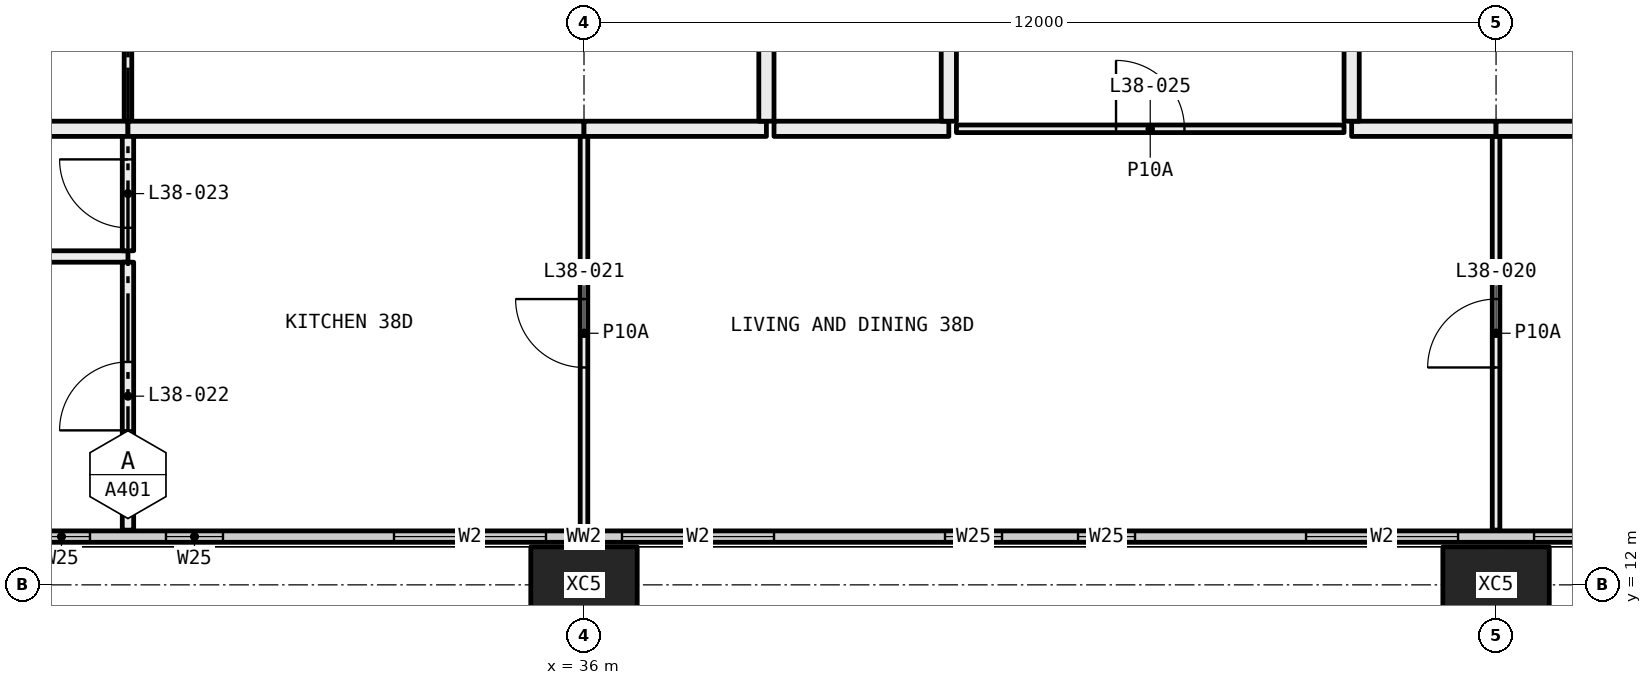
"""IFC4 building model, lengths in metres.
Left out: names, types, materials, properties, quantities, classifications, styles, units other than length and angle.
Written with IfcOpenShell. Run it as: python <this file> out.ifc"""

import sys

from ifc_helpers import new_model, si_unit, direction, frame, frame_2d, origin, origin_2d, place, context, subcontext, project, spatial, rectangle, hollow_rectangle, extrude, element, fill, save


model = new_model("IFC4")
c1 = context("Model", 3, precision=1e-05, world=origin(), true_north=direction((0.0, 1.0)))
c2 = subcontext(c1, "Body", "Model", "MODEL_VIEW")
j1 = project(units=[si_unit("LENGTHUNIT", "METRE"), si_unit("PLANEANGLEUNIT", "RADIAN")], contexts=[c1])
p1 = place(None, origin())
s1 = spatial("IfcSite", under=j1, at=p1, CompositionType="ELEMENT")
p2 = place(p1, origin())
s2 = spatial("IfcBuilding", under=s1, at=p2, CompositionType="ELEMENT")
p3 = place(p2, frame((0.0, 0.0, 144.9)))
s3 = spatial("IfcBuildingStorey", under=s2, at=p3, CompositionType="ELEMENT", Elevation=144.9)
for number, where, z_axis, x_axis in (
    (1, (36.0, 12.0, -0.4), (0.0, 0.0, 1.0), (1.0, 0.0, 0.0)),
    (2, (48.0, 12.0, -0.4), (0.0, 0.0, 1.0), (1.0, 0.0, 0.0)),
):
    element("IfcColumn", number, at=place(p3, frame(where, z_axis=z_axis, x_axis=x_axis)), inside=s3, PredefinedType="COLUMN", context=c2, shape_type="SweptSolid", body=[
        extrude(hollow_rectangle(XDim=1.4, YDim=1.0, WallThickness=0.055, at=origin_2d()), origin(), (0.0, 0.0, 1.0), 3.45),
    ])
p4 = place(p3, frame((6.56, 12.635, 0.0), z_axis=(0.0, 0.0, 1.0), x_axis=(1.0, 0.0, 0.0)))
e3 = element("IfcWall", 3, at=p4, inside=s3, PredefinedType="ELEMENTEDWALL", context=c2, shape_type="SweptSolid", body=[
    extrude(rectangle(XDim=58.88, YDim=0.15, at=frame_2d((29.44, 0.0))), origin(), (0.0, 0.0, 1.0), 3.05),
])
p5 = place(p4, frame((0.44, 0.0, 0.45)))
e4 = element("IfcOpeningElement", 4, at=p5, cuts=e3, PredefinedType="OPENING", context=c2, shape_type="SweptSolid", body=[
    extrude(rectangle(XDim=4.5, YDim=2.55, at=frame_2d((2.25, 1.275))), frame((0.0, 0.085, 0.0), z_axis=(0.0, -1.0, 0.0), x_axis=(1.0, 0.0, 0.0)), (0.0, 0.0, 1.0), 0.17),
])
p6 = place(p4, frame((5.94, 0.0, 0.45)))
e5 = element("IfcOpeningElement", 5, at=p6, cuts=e3, PredefinedType="OPENING", context=c2, shape_type="SweptSolid", body=[
    extrude(rectangle(XDim=2.0, YDim=2.55, at=frame_2d((1.0, 1.275))), frame((0.0, 0.085, 0.0), z_axis=(0.0, -1.0, 0.0), x_axis=(1.0, 0.0, 0.0)), (0.0, 0.0, 1.0), 0.17),
])
p7 = place(p4, frame((10.19, 0.0, 0.45)))
e6 = element("IfcOpeningElement", 6, at=p7, cuts=e3, PredefinedType="OPENING", context=c2, shape_type="SweptSolid", body=[
    extrude(rectangle(XDim=0.75, YDim=2.55, at=frame_2d((0.375, 1.275))), frame((0.0, 0.085, 0.0), z_axis=(0.0, -1.0, 0.0), x_axis=(1.0, 0.0, 0.0)), (0.0, 0.0, 1.0), 0.17),
])
p8 = place(p4, frame((11.94, 0.0, 0.45)))
e7 = element("IfcOpeningElement", 7, at=p8, cuts=e3, PredefinedType="OPENING", context=c2, shape_type="SweptSolid", body=[
    extrude(rectangle(XDim=0.75, YDim=2.55, at=frame_2d((0.375, 1.275))), frame((0.0, 0.085, 0.0), z_axis=(0.0, -1.0, 0.0), x_axis=(1.0, 0.0, 0.0)), (0.0, 0.0, 1.0), 0.17),
])
p9 = place(p4, frame((14.94, 0.0, 0.45)))
e8 = element("IfcOpeningElement", 8, at=p9, cuts=e3, PredefinedType="OPENING", context=c2, shape_type="SweptSolid", body=[
    extrude(rectangle(XDim=2.0, YDim=2.55, at=frame_2d((1.0, 1.275))), frame((0.0, 0.085, 0.0), z_axis=(0.0, -1.0, 0.0), x_axis=(1.0, 0.0, 0.0)), (0.0, 0.0, 1.0), 0.17),
])
p10 = place(p4, frame((17.94, 0.0, 0.45)))
e9 = element("IfcOpeningElement", 9, at=p10, cuts=e3, PredefinedType="OPENING", context=c2, shape_type="SweptSolid", body=[
    extrude(rectangle(XDim=2.0, YDim=2.55, at=frame_2d((1.0, 1.275))), frame((0.0, 0.085, 0.0), z_axis=(0.0, -1.0, 0.0), x_axis=(1.0, 0.0, 0.0)), (0.0, 0.0, 1.0), 0.17),
])
p11 = place(p4, frame((22.19, 0.0, 0.45)))
e10 = element("IfcOpeningElement", 10, at=p11, cuts=e3, PredefinedType="OPENING", context=c2, shape_type="SweptSolid", body=[
    extrude(rectangle(XDim=0.75, YDim=2.55, at=frame_2d((0.375, 1.275))), frame((0.0, 0.085, 0.0), z_axis=(0.0, -1.0, 0.0), x_axis=(1.0, 0.0, 0.0)), (0.0, 0.0, 1.0), 0.17),
])
p12 = place(p4, frame((23.94, 0.0, 0.45)))
e11 = element("IfcOpeningElement", 11, at=p12, cuts=e3, PredefinedType="OPENING", context=c2, shape_type="SweptSolid", body=[
    extrude(rectangle(XDim=0.75, YDim=2.55, at=frame_2d((0.375, 1.275))), frame((0.0, 0.085, 0.0), z_axis=(0.0, -1.0, 0.0), x_axis=(1.0, 0.0, 0.0)), (0.0, 0.0, 1.0), 0.17),
])
p13 = place(p4, frame((26.94, 0.0, 0.45)))
e12 = element("IfcOpeningElement", 12, at=p13, cuts=e3, PredefinedType="OPENING", context=c2, shape_type="SweptSolid", body=[
    extrude(rectangle(XDim=2.0, YDim=2.55, at=frame_2d((1.0, 1.275))), frame((0.0, 0.085, 0.0), z_axis=(0.0, -1.0, 0.0), x_axis=(1.0, 0.0, 0.0)), (0.0, 0.0, 1.0), 0.17),
])
p14 = place(p4, frame((29.94, 0.0, 0.45)))
e13 = element("IfcOpeningElement", 13, at=p14, cuts=e3, PredefinedType="OPENING", context=c2, shape_type="SweptSolid", body=[
    extrude(rectangle(XDim=2.0, YDim=2.55, at=frame_2d((1.0, 1.275))), frame((0.0, 0.085, 0.0), z_axis=(0.0, -1.0, 0.0), x_axis=(1.0, 0.0, 0.0)), (0.0, 0.0, 1.0), 0.17),
])
p15 = place(p4, frame((34.19, 0.0, 0.45)))
e14 = element("IfcOpeningElement", 14, at=p15, cuts=e3, PredefinedType="OPENING", context=c2, shape_type="SweptSolid", body=[
    extrude(rectangle(XDim=0.75, YDim=2.55, at=frame_2d((0.375, 1.275))), frame((0.0, 0.085, 0.0), z_axis=(0.0, -1.0, 0.0), x_axis=(1.0, 0.0, 0.0)), (0.0, 0.0, 1.0), 0.17),
])
p16 = place(p4, frame((35.94, 0.0, 0.45)))
e15 = element("IfcOpeningElement", 15, at=p16, cuts=e3, PredefinedType="OPENING", context=c2, shape_type="SweptSolid", body=[
    extrude(rectangle(XDim=0.75, YDim=2.55, at=frame_2d((0.375, 1.275))), frame((0.0, 0.085, 0.0), z_axis=(0.0, -1.0, 0.0), x_axis=(1.0, 0.0, 0.0)), (0.0, 0.0, 1.0), 0.17),
])
p17 = place(p4, frame((38.94, 0.0, 0.45)))
e16 = element("IfcOpeningElement", 16, at=p17, cuts=e3, PredefinedType="OPENING", context=c2, shape_type="SweptSolid", body=[
    extrude(rectangle(XDim=2.0, YDim=2.55, at=frame_2d((1.0, 1.275))), frame((0.0, 0.085, 0.0), z_axis=(0.0, -1.0, 0.0), x_axis=(1.0, 0.0, 0.0)), (0.0, 0.0, 1.0), 0.17),
])
p18 = place(p4, frame((41.94, 0.0, 0.45)))
e17 = element("IfcOpeningElement", 17, at=p18, cuts=e3, PredefinedType="OPENING", context=c2, shape_type="SweptSolid", body=[
    extrude(rectangle(XDim=2.0, YDim=2.55, at=frame_2d((1.0, 1.275))), frame((0.0, 0.085, 0.0), z_axis=(0.0, -1.0, 0.0), x_axis=(1.0, 0.0, 0.0)), (0.0, 0.0, 1.0), 0.17),
])
p19 = place(p4, frame((46.19, 0.0, 0.45)))
e18 = element("IfcOpeningElement", 18, at=p19, cuts=e3, PredefinedType="OPENING", context=c2, shape_type="SweptSolid", body=[
    extrude(rectangle(XDim=0.75, YDim=2.55, at=frame_2d((0.375, 1.275))), frame((0.0, 0.085, 0.0), z_axis=(0.0, -1.0, 0.0), x_axis=(1.0, 0.0, 0.0)), (0.0, 0.0, 1.0), 0.17),
])
p20 = place(p4, frame((47.94, 0.0, 0.45)))
e19 = element("IfcOpeningElement", 19, at=p20, cuts=e3, PredefinedType="OPENING", context=c2, shape_type="SweptSolid", body=[
    extrude(rectangle(XDim=0.75, YDim=2.55, at=frame_2d((0.375, 1.275))), frame((0.0, 0.085, 0.0), z_axis=(0.0, -1.0, 0.0), x_axis=(1.0, 0.0, 0.0)), (0.0, 0.0, 1.0), 0.17),
])
p21 = place(p4, frame((50.94, 0.0, 0.45)))
e20 = element("IfcOpeningElement", 20, at=p21, cuts=e3, PredefinedType="OPENING", context=c2, shape_type="SweptSolid", body=[
    extrude(rectangle(XDim=2.0, YDim=2.55, at=frame_2d((1.0, 1.275))), frame((0.0, 0.085, 0.0), z_axis=(0.0, -1.0, 0.0), x_axis=(1.0, 0.0, 0.0)), (0.0, 0.0, 1.0), 0.17),
])
p22 = place(p4, frame((53.94, 0.0, 0.45)))
e21 = element("IfcOpeningElement", 21, at=p22, cuts=e3, PredefinedType="OPENING", context=c2, shape_type="SweptSolid", body=[
    extrude(rectangle(XDim=4.5, YDim=2.55, at=frame_2d((2.25, 1.275))), frame((0.0, 0.085, 0.0), z_axis=(0.0, -1.0, 0.0), x_axis=(1.0, 0.0, 0.0)), (0.0, 0.0, 1.0), 0.17),
])
p23 = place(p3, frame((30.0, 18.1, 0.0), z_axis=(0.0, 0.0, 1.0), x_axis=(0.0, 1.0, 0.0)))
e22 = element("IfcWall", 22, at=p23, inside=s3, PredefinedType="PARTITIONING", context=c2, shape_type="SweptSolid", body=[
    extrude(rectangle(XDim=6.2, YDim=0.1, at=frame_2d((3.1, 0.0))), origin(), (0.0, 0.0, 1.0), 2.45),
])
p24 = place(p3, frame((25.9, 18.0, 0.0), z_axis=(0.0, 0.0, 1.0), x_axis=(1.0, 0.0, 0.0)))
e23 = element("IfcWall", 23, at=p24, inside=s3, PredefinedType="PARTITIONING", context=c2, shape_type="SweptSolid", body=[
    extrude(rectangle(XDim=4.1, YDim=0.2, at=frame_2d((2.05, 0.0))), origin(), (0.0, 0.0, 1.0), 3.05),
])
p25 = place(p3, frame((30.0, 18.0, 0.0), z_axis=(0.0, 0.0, 1.0), x_axis=(1.0, 0.0, 0.0)))
e24 = element("IfcWall", 24, at=p25, inside=s3, PredefinedType="PARTITIONING", context=c2, shape_type="SweptSolid", body=[
    extrude(rectangle(XDim=6.0, YDim=0.2, at=frame_2d((3.0, 0.0))), origin(), (0.0, 0.0, 1.0), 2.45),
])
p26 = place(p3, frame((36.0, 18.0, 0.0), z_axis=(0.0, 0.0, 1.0), x_axis=(1.0, 0.0, 0.0)))
e25 = element("IfcWall", 25, at=p26, inside=s3, PredefinedType="PARTITIONING", context=c2, shape_type="SweptSolid", body=[
    extrude(rectangle(XDim=2.4, YDim=0.2, at=frame_2d((1.2, 0.0))), origin(), (0.0, 0.0, 1.0), 2.45),
])
p27 = place(p3, frame((38.4, 18.1, 0.0), z_axis=(0.0, 0.0, 1.0), x_axis=(0.0, 1.0, 0.0)))
e26 = element("IfcWall", 26, at=p27, inside=s3, PredefinedType="PARTITIONING", context=c2, shape_type="SweptSolid", body=[
    extrude(rectangle(XDim=6.2, YDim=0.2, at=frame_2d((3.1, 0.0))), origin(), (0.0, 0.0, 1.0), 2.45),
])
p28 = place(p3, frame((30.0, 16.32, 0.0), z_axis=(0.0, 0.0, 1.0), x_axis=(-1.0, 0.0, 0.0)))
e27 = element("IfcWall", 27, at=p28, inside=s3, PredefinedType="PARTITIONING", context=c2, shape_type="SweptSolid", body=[
    extrude(rectangle(XDim=5.9, YDim=0.15, at=frame_2d((2.95, 0.0))), origin(), (0.0, 0.0, 1.0), 3.05),
])
p29 = place(p3, frame((30.0, 12.72, 0.0), z_axis=(0.0, 0.0, 1.0), x_axis=(0.0, 1.0, 0.0)))
e28 = element("IfcWall", 28, at=p29, inside=s3, PredefinedType="PARTITIONING", context=c2, shape_type="SweptSolid", body=[
    extrude(rectangle(XDim=3.525, YDim=0.15, at=frame_2d((1.763, 0.0))), origin(), (0.0, 0.0, 1.0), 3.05),
])
p30 = place(p29, frame((1.312, 0.0, 0.0)))
e29 = element("IfcOpeningElement", 29, at=p30, cuts=e28, PredefinedType="OPENING", context=c2, shape_type="SweptSolid", body=[
    extrude(rectangle(XDim=0.9, YDim=2.1, at=frame_2d((0.45, 1.05))), frame((0.0, 0.085, 0.0), z_axis=(0.0, -1.0, 0.0), x_axis=(1.0, 0.0, 0.0)), (0.0, 0.0, 1.0), 0.17),
])
p31 = place(p3, frame((30.0, 16.395, 0.0), z_axis=(0.0, 0.0, 1.0), x_axis=(0.0, 1.0, 0.0)))
e30 = element("IfcWall", 30, at=p31, inside=s3, PredefinedType="PARTITIONING", context=c2, shape_type="SweptSolid", body=[
    extrude(rectangle(XDim=1.505, YDim=0.15, at=frame_2d((0.752, 0.0))), origin(), (0.0, 0.0, 1.0), 3.05),
])
p32 = place(p31, frame((0.302, 0.0, 0.0)))
e31 = element("IfcOpeningElement", 31, at=p32, cuts=e30, PredefinedType="OPENING", context=c2, shape_type="SweptSolid", body=[
    extrude(rectangle(XDim=0.9, YDim=2.1, at=frame_2d((0.45, 1.05))), frame((0.0, 0.085, 0.0), z_axis=(0.0, -1.0, 0.0), x_axis=(1.0, 0.0, 0.0)), (0.0, 0.0, 1.0), 0.17),
])
p33 = place(p3, frame((36.0, 12.72, 0.0), z_axis=(0.0, 0.0, 1.0), x_axis=(0.0, 1.0, 0.0)))
e32 = element("IfcWall", 32, at=p33, inside=s3, PredefinedType="PARTITIONING", context=c2, shape_type="SweptSolid", body=[
    extrude(rectangle(XDim=5.18, YDim=0.1, at=frame_2d((2.59, 0.0))), origin(), (0.0, 0.0, 1.0), 2.45),
])
p34 = place(p33, frame((2.14, 0.0, 0.0)))
e33 = element("IfcOpeningElement", 33, at=p34, cuts=e32, PredefinedType="OPENING", context=c2, shape_type="SweptSolid", body=[
    extrude(rectangle(XDim=0.9, YDim=2.1, at=frame_2d((0.45, 1.05))), frame((0.0, 0.06, 0.0), z_axis=(0.0, -1.0, 0.0), x_axis=(1.0, 0.0, 0.0)), (0.0, 0.0, 1.0), 0.12),
])
p35 = place(p3, frame((48.0, 12.72, 0.0), z_axis=(0.0, 0.0, 1.0), x_axis=(0.0, 1.0, 0.0)))
e34 = element("IfcWall", 34, at=p35, inside=s3, PredefinedType="PARTITIONING", context=c2, shape_type="SweptSolid", body=[
    extrude(rectangle(XDim=5.18, YDim=0.1, at=frame_2d((2.59, 0.0))), origin(), (0.0, 0.0, 1.0), 3.05),
])
p36 = place(p35, frame((2.14, 0.0, 0.0)))
e35 = element("IfcOpeningElement", 35, at=p36, cuts=e34, PredefinedType="OPENING", context=c2, shape_type="SweptSolid", body=[
    extrude(rectangle(XDim=0.9, YDim=2.1, at=frame_2d((0.45, 1.05))), frame((0.0, 0.06, 0.0), z_axis=(0.0, -1.0, 0.0), x_axis=(1.0, 0.0, 0.0)), (0.0, 0.0, 1.0), 0.12),
])
p37 = place(p3, frame((46.0, 18.0, 0.0), z_axis=(0.0, 0.0, 1.0), x_axis=(-1.0, 0.0, 0.0)))
e36 = element("IfcWall", 36, at=p37, inside=s3, PredefinedType="PARTITIONING", context=c2, shape_type="SweptSolid", body=[
    extrude(rectangle(XDim=5.1, YDim=0.1, at=frame_2d((2.55, 0.0))), origin(), (0.0, 0.0, 1.0), 3.05),
])
p38 = place(p37, frame((2.1, 0.0, 0.0)))
e37 = element("IfcOpeningElement", 37, at=p38, cuts=e36, PredefinedType="OPENING", context=c2, shape_type="SweptSolid", body=[
    extrude(rectangle(XDim=0.9, YDim=2.1, at=frame_2d((0.45, 1.05))), frame((0.0, 0.06, 0.0), z_axis=(0.0, -1.0, 0.0), x_axis=(1.0, 0.0, 0.0)), (0.0, 0.0, 1.0), 0.12),
])
p39 = place(p3, frame((40.8, 18.0, 0.0), z_axis=(0.0, 0.0, 1.0), x_axis=(-1.0, 0.0, 0.0)))
e38 = element("IfcWall", 38, at=p39, inside=s3, PredefinedType="PARTITIONING", context=c2, shape_type="SweptSolid", body=[
    extrude(rectangle(XDim=2.3, YDim=0.2, at=frame_2d((1.15, 0.0))), origin(), (0.0, 0.0, 1.0), 3.05),
])
p40 = place(p3, frame((48.0, 18.0, 0.0), z_axis=(0.0, 0.0, 1.0), x_axis=(-1.0, 0.0, 0.0)))
e39 = element("IfcWall", 39, at=p40, inside=s3, PredefinedType="PARTITIONING", context=c2, shape_type="SweptSolid", body=[
    extrude(rectangle(XDim=1.9, YDim=0.2, at=frame_2d((0.95, 0.0))), origin(), (0.0, 0.0, 1.0), 3.05),
])
p41 = place(p3, frame((54.0, 18.0, 0.0), z_axis=(0.0, 0.0, 1.0), x_axis=(-1.0, 0.0, 0.0)))
e40 = element("IfcWall", 40, at=p41, inside=s3, PredefinedType="PARTITIONING", context=c2, shape_type="SweptSolid", body=[
    extrude(rectangle(XDim=6.0, YDim=0.2, at=frame_2d((3.0, 0.0))), origin(), (0.0, 0.0, 1.0), 3.05),
])
p42 = place(p41, frame((2.5, 0.0, 0.0)))
e41 = element("IfcOpeningElement", 41, at=p42, cuts=e40, PredefinedType="OPENING", context=c2, shape_type="SweptSolid", body=[
    extrude(rectangle(XDim=1.0, YDim=2.1, at=frame_2d((0.5, 1.05))), frame((0.0, 0.11, 0.0), z_axis=(0.0, -1.0, 0.0), x_axis=(1.0, 0.0, 0.0)), (0.0, 0.0, 1.0), 0.22),
])
p43 = place(p3, frame((40.8, 23.9, 0.0), z_axis=(0.0, 0.0, 1.0), x_axis=(0.0, -1.0, 0.0)))
e42 = element("IfcWall", 42, at=p43, inside=s3, PredefinedType="PARTITIONING", context=c2, shape_type="SweptSolid", body=[
    extrude(rectangle(XDim=5.8, YDim=0.2, at=frame_2d((2.9, 0.0))), origin(), (0.0, 0.0, 1.0), 3.05),
])
p44 = place(p3, frame((46.1, 18.1, 0.0), z_axis=(0.0, 0.0, 1.0), x_axis=(0.0, 1.0, 0.0)))
e43 = element("IfcWall", 43, at=p44, inside=s3, PredefinedType="PARTITIONING", context=c2, shape_type="SweptSolid", body=[
    extrude(rectangle(XDim=6.2, YDim=0.2, at=frame_2d((3.1, 0.0))), origin(), (0.0, 0.0, 1.0), 2.45),
])
p45 = place(p11, origin())
e44 = element("IfcWindow", 44, at=p45, inside=s3, PartitioningType="SINGLE_PANEL", PredefinedType="WINDOW", context=c2, shape_type="SweptSolid", body=[
    extrude(rectangle(XDim=0.75, YDim=2.55, at=frame_2d((0.375, 1.275))), frame((0.0, 0.03, 0.0), z_axis=(0.0, -1.0, 0.0), x_axis=(1.0, 0.0, 0.0)), (0.0, 0.0, 1.0), 0.06),
])
fill(e10, e44)
p46 = place(p12, origin())
e45 = element("IfcWindow", 45, at=p46, inside=s3, PartitioningType="SINGLE_PANEL", PredefinedType="WINDOW", context=c2, shape_type="SweptSolid", body=[
    extrude(rectangle(XDim=0.75, YDim=2.55, at=frame_2d((0.375, 1.275))), frame((0.0, 0.03, 0.0), z_axis=(0.0, -1.0, 0.0), x_axis=(1.0, 0.0, 0.0)), (0.0, 0.0, 1.0), 0.06),
])
fill(e11, e45)
p47 = place(p13, origin())
e46 = element("IfcWindow", 46, at=p47, inside=s3, PartitioningType="SINGLE_PANEL", PredefinedType="WINDOW", context=c2, shape_type="SweptSolid", body=[
    extrude(rectangle(XDim=2.0, YDim=2.55, at=frame_2d((1.0, 1.275))), frame((0.0, 0.03, 0.0), z_axis=(0.0, -1.0, 0.0), x_axis=(1.0, 0.0, 0.0)), (0.0, 0.0, 1.0), 0.06),
])
fill(e12, e46)
p48 = place(p14, origin())
e47 = element("IfcWindow", 47, at=p48, inside=s3, PartitioningType="SINGLE_PANEL", PredefinedType="WINDOW", context=c2, shape_type="SweptSolid", body=[
    extrude(rectangle(XDim=2.0, YDim=2.55, at=frame_2d((1.0, 1.275))), frame((0.0, 0.03, 0.0), z_axis=(0.0, -1.0, 0.0), x_axis=(1.0, 0.0, 0.0)), (0.0, 0.0, 1.0), 0.06),
])
fill(e13, e47)
p49 = place(p15, origin())
e48 = element("IfcWindow", 48, at=p49, inside=s3, PartitioningType="SINGLE_PANEL", PredefinedType="WINDOW", context=c2, shape_type="SweptSolid", body=[
    extrude(rectangle(XDim=0.75, YDim=2.55, at=frame_2d((0.375, 1.275))), frame((0.0, 0.03, 0.0), z_axis=(0.0, -1.0, 0.0), x_axis=(1.0, 0.0, 0.0)), (0.0, 0.0, 1.0), 0.06),
])
fill(e14, e48)
p50 = place(p16, origin())
e49 = element("IfcWindow", 49, at=p50, inside=s3, PartitioningType="SINGLE_PANEL", PredefinedType="WINDOW", context=c2, shape_type="SweptSolid", body=[
    extrude(rectangle(XDim=0.75, YDim=2.55, at=frame_2d((0.375, 1.275))), frame((0.0, 0.03, 0.0), z_axis=(0.0, -1.0, 0.0), x_axis=(1.0, 0.0, 0.0)), (0.0, 0.0, 1.0), 0.06),
])
fill(e15, e49)
p51 = place(p17, origin())
e50 = element("IfcWindow", 50, at=p51, inside=s3, PartitioningType="SINGLE_PANEL", PredefinedType="WINDOW", context=c2, shape_type="SweptSolid", body=[
    extrude(rectangle(XDim=2.0, YDim=2.55, at=frame_2d((1.0, 1.275))), frame((0.0, 0.03, 0.0), z_axis=(0.0, -1.0, 0.0), x_axis=(1.0, 0.0, 0.0)), (0.0, 0.0, 1.0), 0.06),
])
fill(e16, e50)
p52 = place(p18, origin())
e51 = element("IfcWindow", 51, at=p52, inside=s3, PartitioningType="SINGLE_PANEL", PredefinedType="WINDOW", context=c2, shape_type="SweptSolid", body=[
    extrude(rectangle(XDim=2.0, YDim=2.55, at=frame_2d((1.0, 1.275))), frame((0.0, 0.03, 0.0), z_axis=(0.0, -1.0, 0.0), x_axis=(1.0, 0.0, 0.0)), (0.0, 0.0, 1.0), 0.06),
])
fill(e17, e51)
p53 = place(p36, origin())
e52 = element("IfcDoor", 52, at=p53, inside=s3, OperationType="SINGLE_SWING_RIGHT", PredefinedType="DOOR", context=c2, shape_type="SweptSolid", body=[
    extrude(rectangle(XDim=0.9, YDim=2.1, at=frame_2d((0.45, 1.05))), frame((0.0, 0.025, 0.0), z_axis=(0.0, -1.0, 0.0), x_axis=(1.0, 0.0, 0.0)), (0.0, 0.0, 1.0), 0.05),
])
fill(e35, e52)
p54 = place(p34, origin())
e53 = element("IfcDoor", 53, at=p54, inside=s3, OperationType="SINGLE_SWING_LEFT", PredefinedType="DOOR", context=c2, shape_type="SweptSolid", body=[
    extrude(rectangle(XDim=0.9, YDim=2.1, at=frame_2d((0.45, 1.05))), frame((0.0, 0.025, 0.0), z_axis=(0.0, -1.0, 0.0), x_axis=(1.0, 0.0, 0.0)), (0.0, 0.0, 1.0), 0.05),
])
fill(e33, e53)
p55 = place(p30, origin())
e54 = element("IfcDoor", 54, at=p55, inside=s3, OperationType="SINGLE_SWING_RIGHT", PredefinedType="DOOR", context=c2, shape_type="SweptSolid", body=[
    extrude(rectangle(XDim=0.9, YDim=2.1, at=frame_2d((0.45, 1.05))), frame((0.0, 0.025, 0.0), z_axis=(0.0, -1.0, 0.0), x_axis=(1.0, 0.0, 0.0)), (0.0, 0.0, 1.0), 0.05),
])
fill(e29, e54)
p56 = place(p32, origin())
e55 = element("IfcDoor", 55, at=p56, inside=s3, OperationType="SINGLE_SWING_LEFT", PredefinedType="DOOR", context=c2, shape_type="SweptSolid", body=[
    extrude(rectangle(XDim=0.9, YDim=2.1, at=frame_2d((0.45, 1.05))), frame((0.0, 0.025, 0.0), z_axis=(0.0, -1.0, 0.0), x_axis=(1.0, 0.0, 0.0)), (0.0, 0.0, 1.0), 0.05),
])
fill(e31, e55)
p57 = place(p38, frame((0.9, 0.0, 0.0), x_axis=(-1.0, 0.0, 0.0)))
e56 = element("IfcDoor", 56, at=p57, inside=s3, OperationType="SINGLE_SWING_RIGHT", PredefinedType="DOOR", context=c2, shape_type="SweptSolid", body=[
    extrude(rectangle(XDim=0.9, YDim=2.1, at=frame_2d((0.45, 1.05))), frame((0.0, 0.025, 0.0), z_axis=(0.0, -1.0, 0.0), x_axis=(1.0, 0.0, 0.0)), (0.0, 0.0, 1.0), 0.05),
])
fill(e37, e56)
save(model, sys.argv[1])
